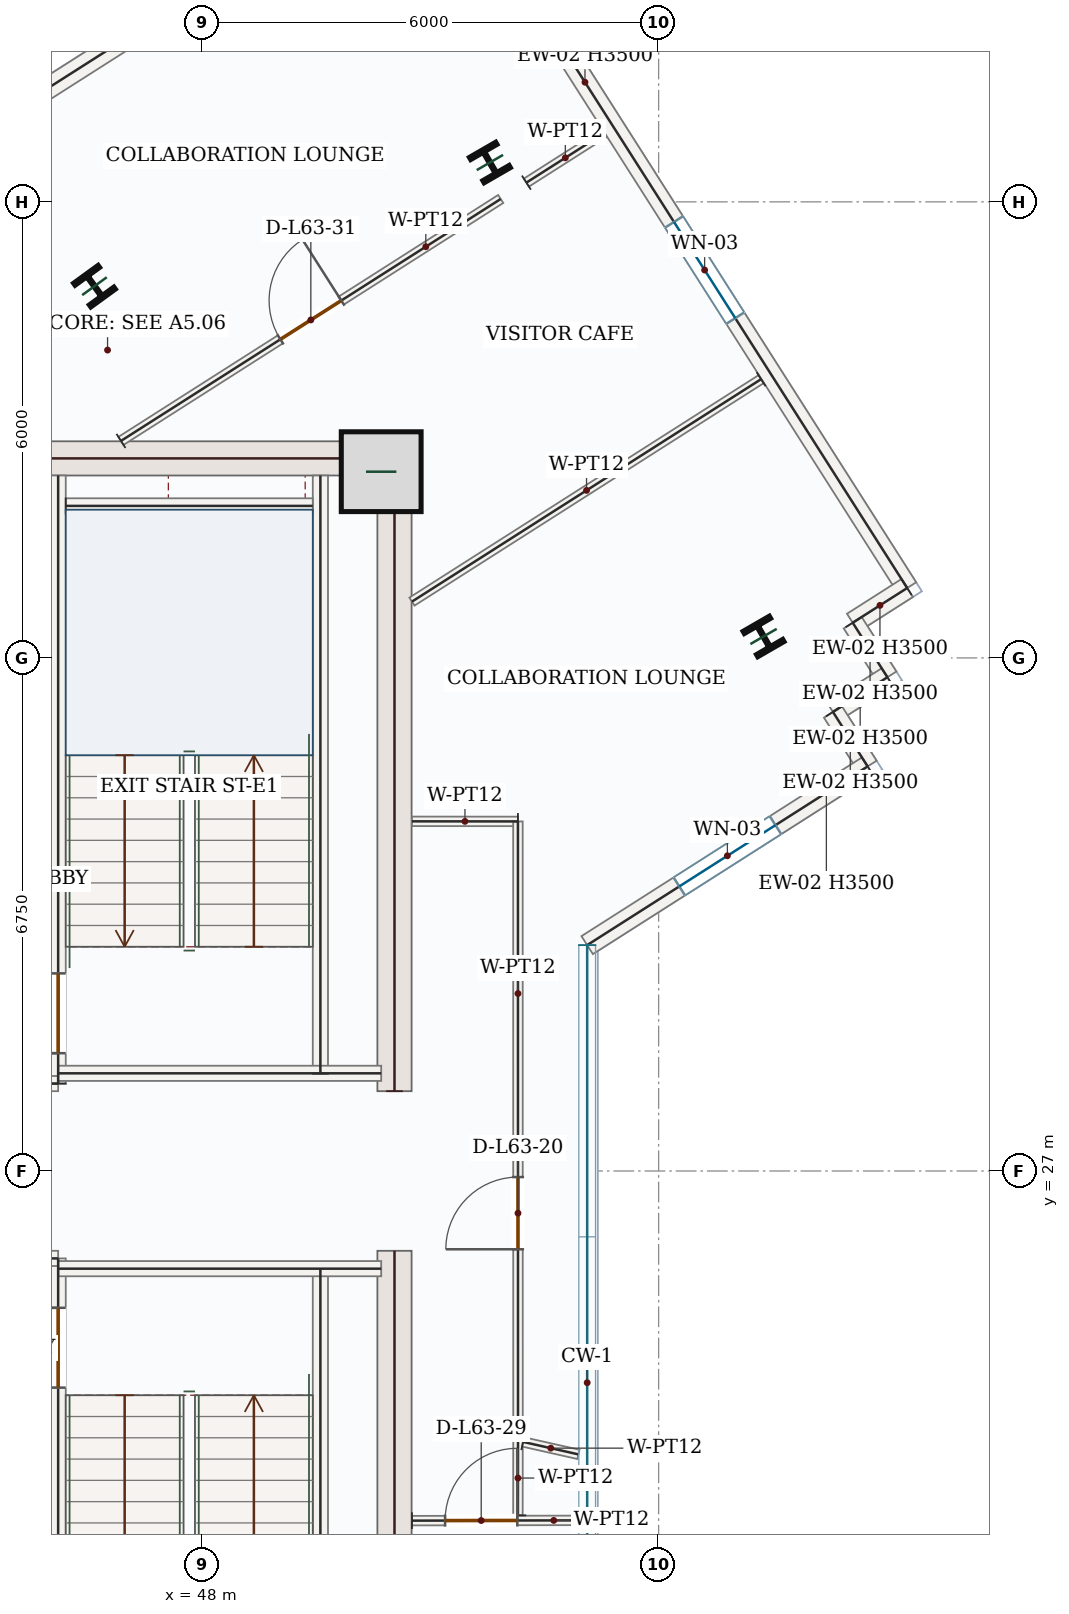
"""IFC4 building model, lengths in metres.
Left out: names, types, materials, properties, quantities, classifications, styles, units other than length and angle.
Written with IfcOpenShell. Run it as: python <this file> out.ifc"""

import sys

from ifc_helpers import new_model, si_unit, direction, frame, frame_2d, origin, origin_2d, place, context, subcontext, project, spatial, rectangle, i_section, extrude, source, transform, mapped, element, fill, save


model = new_model("IFC4")
c1 = context("Model", 3, precision=1e-05, world=origin(), true_north=direction((0.0, 1.0)))
c2 = subcontext(c1, "Body", "Model", "MODEL_VIEW")
j1 = project(units=[si_unit("LENGTHUNIT", "METRE"), si_unit("PLANEANGLEUNIT", "RADIAN")], contexts=[c1])
p1 = place(None, origin())
s1 = spatial("IfcSite", under=j1, at=p1, CompositionType="ELEMENT")
p2 = place(p1, origin())
s2 = spatial("IfcBuilding", under=s1, at=p2, CompositionType="ELEMENT")
p3 = place(p2, frame((0.0, 0.0, 265.35)))
s3 = spatial("IfcBuildingStorey", under=s2, at=p3, CompositionType="ELEMENT", Elevation=265.35)
m1 = source(origin(), c2, "Body", "SweptSolid", [
    extrude(rectangle(XDim=8.55, YDim=0.45, at=frame_2d((4.275, 0.0))), origin(), (0.0, 0.0, 1.0), 3.5),
])
for number, where, z_axis, x_axis in (
    (1, (50.525, 17.4, 0.0), (0.0, 0.0, 1.0), (0.0, 1.0, 0.0)),
    (2, (50.525, 28.05, 0.0), (0.0, 0.0, 1.0), (0.0, 1.0, 0.0)),
):
    element("IfcWall", number, at=place(p3, frame(where, z_axis=z_axis, x_axis=x_axis)), inside=s3, PredefinedType="SHEAR", context=c2, shape_type="MappedRepresentation", body=[
        mapped(m1, transform((0.0, 0.0, 0.0), x_axis=(1.0, 0.0, 0.0), y_axis=(0.0, 1.0, 0.0), z_axis=(0.0, 0.0, 1.0), scale=1.0)),
    ])
m2 = source(origin(), c2, "Body", "SweptSolid", [
    extrude(rectangle(XDim=7.1, YDim=0.45, at=frame_2d((3.55, 0.0))), origin(), (0.0, 0.0, 1.0), 3.5),
])
p4 = place(p3, frame((43.2, 36.375, 0.0), z_axis=(0.0, 0.0, 1.0), x_axis=(1.0, 0.0, 0.0)))
e3 = element("IfcWall", 3, at=p4, inside=s3, PredefinedType="SHEAR", context=c2, shape_type="MappedRepresentation", body=[
    mapped(m2, transform((0.0, 0.0, 0.0), x_axis=(1.0, 0.0, 0.0), y_axis=(0.0, 1.0, 0.0), z_axis=(0.0, 0.0, 1.0), scale=1.0)),
])
m3 = source(origin(), c2, "Body", "SweptSolid", [
    extrude(rectangle(XDim=1.05, YDim=1.05, at=origin_2d()), origin(), (0.0, 0.0, 1.0), 3.75),
])
p5 = place(p3, frame((50.35, 36.2, 0.0), z_axis=(0.0, 0.0, 1.0), x_axis=(1.0, 0.0, 0.0)))
e4 = element("IfcColumn", 4, at=p5, inside=s3, PredefinedType="COLUMN", context=c2, shape_type="MappedRepresentation", body=[
    mapped(m3, transform((0.0, 0.0, 0.0), x_axis=(1.0, 0.0, 0.0), y_axis=(0.0, 1.0, 0.0), z_axis=(0.0, 0.0, 1.0), scale=1.0)),
])
m4 = source(origin(), c2, "Body", "SweptSolid", [
    extrude(i_section(OverallWidth=0.399, OverallDepth=0.386, WebThickness=0.021, FlangeThickness=0.033, FilletRadius=0.018, at=origin_2d()), origin(), (0.0, 0.0, 1.0), 3.75),
])
for number, where, z_axis, x_axis in (
    (5, (46.578, 38.641, 0.0), (0.0, 0.0, 1.0), (0.809, 0.588, 0.0)),
    (6, (55.38, 34.032, 0.0), (0.0, 0.0, 1.0), (0.866, 0.5, 0.0)),
    (7, (51.78, 40.268, 0.0), (0.0, 0.0, 1.0), (0.866, 0.5, 0.0)),
):
    element("IfcColumn", number, at=place(p3, frame(where, z_axis=z_axis, x_axis=x_axis)), inside=s3, PredefinedType="COLUMN", context=c2, shape_type="MappedRepresentation", body=[
        mapped(m4, transform((0.0, 0.0, 0.0), x_axis=(1.0, 0.0, 0.0), y_axis=(0.0, 1.0, 0.0), z_axis=(0.0, 0.0, 1.0), scale=1.0)),
    ])
p6 = place(p3, frame((42.849, 39.26, 0.0), z_axis=(0.0, 0.0, 1.0), x_axis=(0.843388565396, 0.537304129669, 0.0)))
e8 = element("IfcWall", 8, at=p6, inside=s3, PredefinedType="SOLIDWALL", context=c2, shape_type="SweptSolid", body=[
    extrude(rectangle(XDim=7.996, YDim=0.28, at=frame_2d((3.998, 0.0))), origin(), (0.0, 0.0, 1.0), 3.5),
])
p7 = place(p6, frame((2.223, 0.0, 0.0)))
e9 = element("IfcOpeningElement", 9, at=p7, cuts=e8, PredefinedType="OPENING", context=c2, shape_type="SweptSolid", body=[
    extrude(rectangle(XDim=1.05, YDim=2.15, at=frame_2d((0.525, 1.075))), frame((0.0, 0.15, 0.0), z_axis=(0.0, -1.0, 0.0), x_axis=(1.0, 0.0, 0.0)), (0.0, 0.0, 1.0), 0.3),
])
p8 = place(p3, frame((51.94, 43.036, 0.0), z_axis=(0.0, 0.0, 1.0), x_axis=(0.537314949054, -0.843381672508, 0.0)))
e10 = element("IfcWall", 10, at=p8, inside=s3, PredefinedType="SOLIDWALL", context=c2, shape_type="SweptSolid", body=[
    extrude(rectangle(XDim=9.92, YDim=0.28, at=frame_2d((4.96, 0.0))), origin(), (0.0, 0.0, 1.0), 3.5),
])
p9 = place(p8, frame((4.21, 0.0, 0.85)))
e11 = element("IfcOpeningElement", 11, at=p9, cuts=e10, PredefinedType="OPENING", context=c2, shape_type="SweptSolid", body=[
    extrude(rectangle(XDim=1.5, YDim=1.5, at=frame_2d((0.75, 0.75))), frame((0.0, 0.15, 0.0), z_axis=(0.0, -1.0, 0.0), x_axis=(1.0, 0.0, 0.0)), (0.0, 0.0, 1.0), 0.3),
])
m5 = source(origin(), c2, "Body", "SweptSolid", [
    extrude(rectangle(XDim=0.85, YDim=0.28, at=frame_2d((0.425, 0.0))), origin(), (0.0, 0.0, 1.0), 3.5),
])
p10 = place(p3, frame((57.27, 34.67, 0.0), z_axis=(0.0, 0.0, 1.0), x_axis=(-0.843401251716, -0.537284215853, 0.0)))
e12 = element("IfcWall", 12, at=p10, inside=s3, PredefinedType="SOLIDWALL", context=c2, shape_type="MappedRepresentation", body=[
    mapped(m5, transform((0.0, 0.0, 0.0), x_axis=(1.0, 0.0, 0.0), y_axis=(0.0, 1.0, 0.0), z_axis=(0.0, 0.0, 1.0), scale=1.0)),
])
m6 = source(origin(), c2, "Body", "SweptSolid", [
    extrude(rectangle(XDim=0.85, YDim=0.28, at=frame_2d((0.425, 0.0))), origin(), (0.0, 0.0, 1.0), 3.5),
])
for number, where, z_axis, x_axis in (
    (13, (56.553, 34.213, 0.0), (0.0, 0.0, 1.0), (0.537, -0.843, 0.0)),
    (14, (57.01, 33.496, 0.0), (0.0, 0.0, 1.0), (-0.843, -0.537, 0.0)),
    (15, (56.293, 33.039, 0.0), (0.0, 0.0, 1.0), (0.537, -0.843, 0.0)),
):
    element("IfcWall", number, at=place(p3, frame(where, z_axis=z_axis, x_axis=x_axis)), inside=s3, PredefinedType="SOLIDWALL", context=c2, shape_type="MappedRepresentation", body=[
        mapped(m6, transform((0.0, 0.0, 0.0), x_axis=(1.0, 0.0, 0.0), y_axis=(0.0, 1.0, 0.0), z_axis=(0.0, 0.0, 1.0), scale=1.0)),
    ])
p11 = place(p3, frame((56.75, 32.323, 0.0), z_axis=(0.0, 0.0, 1.0), x_axis=(-0.843383352012, -0.537312312857, 0.0)))
e16 = element("IfcWall", 16, at=p11, inside=s3, PredefinedType="SOLIDWALL", context=c2, shape_type="SweptSolid", body=[
    extrude(rectangle(XDim=4.375, YDim=0.28, at=frame_2d((2.188, 0.0))), origin(), (0.0, 0.0, 1.0), 3.5),
])
p12 = place(p11, frame((1.438, 0.0, 0.85)))
e17 = element("IfcOpeningElement", 17, at=p12, cuts=e16, PredefinedType="OPENING", context=c2, shape_type="SweptSolid", body=[
    extrude(rectangle(XDim=1.5, YDim=1.5, at=frame_2d((0.75, 0.75))), frame((0.0, 0.15, 0.0), z_axis=(0.0, -1.0, 0.0), x_axis=(1.0, 0.0, 0.0)), (0.0, 0.0, 1.0), 0.3),
])
m7 = source(origin(), c2, "Body", "SweptSolid", [
    extrude(rectangle(XDim=7.87, YDim=0.2, at=frame_2d((3.935, 0.0))), origin(), (0.0, 0.0, 1.0), 3.5),
])
for number, where, z_axis, x_axis in (
    (18, (49.55, 17.85, 0.0), (0.0, 0.0, 1.0), (0.0, 1.0, 0.0)),
    (19, (49.55, 28.28, 0.0), (0.0, 0.0, 1.0), (0.0, 1.0, 0.0)),
):
    element("IfcWall", number, at=place(p3, frame(where, z_axis=z_axis, x_axis=x_axis)), inside=s3, PredefinedType="SOLIDWALL", context=c2, shape_type="MappedRepresentation", body=[
        mapped(m7, transform((0.0, 0.0, 0.0), x_axis=(1.0, 0.0, 0.0), y_axis=(0.0, 1.0, 0.0), z_axis=(0.0, 0.0, 1.0), scale=1.0)),
    ])
p13 = place(p3, frame((46.1, 17.85, 0.0), z_axis=(0.0, 0.0, 1.0), x_axis=(0.0, 1.0, 0.0)))
e20 = element("IfcWall", 20, at=p13, inside=s3, PredefinedType="SOLIDWALL", context=c2, shape_type="SweptSolid", body=[
    extrude(rectangle(XDim=8.0, YDim=0.2, at=frame_2d((4.0, 0.0))), origin(), (0.0, 0.0, 1.0), 3.5),
])
p14 = place(p13, frame((6.3, 0.0, 0.0)))
e21 = element("IfcOpeningElement", 21, at=p14, cuts=e20, PredefinedType="OPENING", context=c2, shape_type="SweptSolid", body=[
    extrude(rectangle(XDim=1.05, YDim=2.15, at=frame_2d((0.525, 1.075))), frame((0.0, 0.11, 0.0), z_axis=(0.0, -1.0, 0.0), x_axis=(1.0, 0.0, 0.0)), (0.0, 0.0, 1.0), 0.22),
])
p15 = place(p3, frame((46.1, 28.15, 0.0), z_axis=(0.0, 0.0, 1.0), x_axis=(0.0, 1.0, 0.0)))
e22 = element("IfcWall", 22, at=p15, inside=s3, PredefinedType="SOLIDWALL", context=c2, shape_type="SweptSolid", body=[
    extrude(rectangle(XDim=8.0, YDim=0.2, at=frame_2d((4.0, 0.0))), origin(), (0.0, 0.0, 1.0), 3.5),
])
p16 = place(p15, frame((0.4, 0.0, 0.0)))
e23 = element("IfcOpeningElement", 23, at=p16, cuts=e22, PredefinedType="OPENING", context=c2, shape_type="SweptSolid", body=[
    extrude(rectangle(XDim=1.05, YDim=2.15, at=frame_2d((0.525, 1.075))), frame((0.0, 0.11, 0.0), z_axis=(0.0, -1.0, 0.0), x_axis=(1.0, 0.0, 0.0)), (0.0, 0.0, 1.0), 0.22),
])
m8 = source(origin(), c2, "Body", "SweptSolid", [
    extrude(rectangle(XDim=3.0, YDim=0.2, at=frame_2d((1.5, 0.0))), origin(), (0.0, 0.0, 1.0), 3.5),
])
p17 = place(p3, frame((43.1, 25.85, 0.0), z_axis=(0.0, 0.0, 1.0), x_axis=(1.0, 0.0, 0.0)))
e24 = element("IfcWall", 24, at=p17, inside=s3, PredefinedType="SOLIDWALL", context=c2, shape_type="MappedRepresentation", body=[
    mapped(m8, transform((0.0, 0.0, 0.0), x_axis=(1.0, 0.0, 0.0), y_axis=(0.0, 1.0, 0.0), z_axis=(0.0, 0.0, 1.0), scale=1.0)),
])
m9 = source(origin(), c2, "Body", "SweptSolid", [
    extrude(rectangle(XDim=4.25, YDim=0.2, at=frame_2d((2.125, 0.0))), origin(), (0.0, 0.0, 1.0), 3.5),
])
p18 = place(p3, frame((46.1, 25.715, 0.0), z_axis=(0.0, 0.0, 1.0), x_axis=(1.0, 0.0, 0.0)))
e25 = element("IfcWall", 25, at=p18, inside=s3, PredefinedType="SOLIDWALL", context=c2, shape_type="MappedRepresentation", body=[
    mapped(m9, transform((0.0, 0.0, 0.0), x_axis=(1.0, 0.0, 0.0), y_axis=(0.0, 1.0, 0.0), z_axis=(0.0, 0.0, 1.0), scale=1.0)),
])
p19 = place(p3, frame((43.1, 28.15, 0.0), z_axis=(0.0, 0.0, 1.0), x_axis=(1.0, 0.0, 0.0)))
e26 = element("IfcWall", 26, at=p19, inside=s3, PredefinedType="SOLIDWALL", context=c2, shape_type="MappedRepresentation", body=[
    mapped(m8, transform((0.0, 0.0, 0.0), x_axis=(1.0, 0.0, 0.0), y_axis=(0.0, 1.0, 0.0), z_axis=(0.0, 0.0, 1.0), scale=1.0)),
])
p20 = place(p3, frame((46.1, 28.285, 0.0), z_axis=(0.0, 0.0, 1.0), x_axis=(1.0, 0.0, 0.0)))
e27 = element("IfcWall", 27, at=p20, inside=s3, PredefinedType="SOLIDWALL", context=c2, shape_type="MappedRepresentation", body=[
    mapped(m9, transform((0.0, 0.0, 0.0), x_axis=(1.0, 0.0, 0.0), y_axis=(0.0, 1.0, 0.0), z_axis=(0.0, 0.0, 1.0), scale=1.0)),
])
m10 = source(origin(), c2, "Body", "SweptSolid", [
    extrude(rectangle(XDim=3.25, YDim=0.2, at=frame_2d((1.625, 0.0))), origin(), (0.0, 0.0, 1.0), 3.5),
])
p21 = place(p3, frame((46.2, 35.75, 0.0), z_axis=(0.0, 0.0, 1.0), x_axis=(1.0, 0.0, 0.0)))
e28 = element("IfcWall", 28, at=p21, inside=s3, PredefinedType="SOLIDWALL", context=c2, shape_type="MappedRepresentation", body=[
    mapped(m10, transform((0.0, 0.0, 0.0), x_axis=(1.0, 0.0, 0.0), y_axis=(0.0, 1.0, 0.0), z_axis=(0.0, 0.0, 1.0), scale=1.0)),
])
p22 = place(p3, frame((46.927, 36.605, 0.0), z_axis=(0.0, 0.0, 1.0), x_axis=(0.843398332862, 0.537288797693, 0.0)))
e29 = element("IfcWall", 29, at=p22, inside=s3, PredefinedType="PARTITIONING", context=c2, shape_type="SweptSolid", body=[
    extrude(rectangle(XDim=5.924, YDim=0.125, at=frame_2d((2.962, 0.0))), origin(), (0.0, 0.0, 1.0), 3.5),
])
p23 = place(p22, frame((2.487, 0.0, 0.0)))
e30 = element("IfcOpeningElement", 30, at=p23, cuts=e29, PredefinedType="OPENING", context=c2, shape_type="SweptSolid", body=[
    extrude(rectangle(XDim=0.95, YDim=2.15, at=frame_2d((0.475, 1.075))), frame((0.0, 0.073, 0.0), z_axis=(0.0, -1.0, 0.0), x_axis=(1.0, 0.0, 0.0)), (0.0, 0.0, 1.0), 0.145),
])
m11 = source(origin(), c2, "Body", "SweptSolid", [
    extrude(rectangle(XDim=1.215, YDim=0.125, at=frame_2d((0.607, 0.0))), origin(), (0.0, 0.0, 1.0), 3.5),
])
p24 = place(p3, frame((52.26, 40.003, 0.0), z_axis=(0.0, 0.0, 1.0), x_axis=(0.84340481812, 0.537278617453, 0.0)))
e31 = element("IfcWall", 31, at=p24, inside=s3, PredefinedType="PARTITIONING", context=c2, shape_type="MappedRepresentation", body=[
    mapped(m11, transform((0.0, 0.0, 0.0), x_axis=(1.0, 0.0, 0.0), y_axis=(0.0, 1.0, 0.0), z_axis=(0.0, 0.0, 1.0), scale=1.0)),
])
m12 = source(origin(), c2, "Body", "SweptSolid", [
    extrude(rectangle(XDim=5.446, YDim=0.125, at=frame_2d((2.723, 0.0))), origin(), (0.0, 0.0, 1.0), 3.5),
])
p25 = place(p3, frame((55.348, 37.417, 0.0), z_axis=(0.0, 0.0, 1.0), x_axis=(-0.843395566027, -0.537293140851, 0.0)))
e32 = element("IfcWall", 32, at=p25, inside=s3, PredefinedType="PARTITIONING", context=c2, shape_type="MappedRepresentation", body=[
    mapped(m12, transform((0.0, 0.0, 0.0), x_axis=(1.0, 0.0, 0.0), y_axis=(0.0, 1.0, 0.0), z_axis=(0.0, 0.0, 1.0), scale=1.0)),
])
p26 = place(p3, frame((50.755, 22.4, 0.0), z_axis=(0.0, 0.0, 1.0), x_axis=(0.999998787702, 0.001557110781, 0.0)))
e33 = element("IfcWall", 33, at=p26, inside=s3, PredefinedType="PARTITIONING", context=c2, shape_type="SweptSolid", body=[
    extrude(rectangle(XDim=2.195, YDim=0.125, at=frame_2d((1.098, 0.0))), origin(), (0.0, 0.0, 1.0), 3.5),
])
p27 = place(p26, frame((0.436, 0.0, 0.0)))
e34 = element("IfcOpeningElement", 34, at=p27, cuts=e33, PredefinedType="OPENING", context=c2, shape_type="SweptSolid", body=[
    extrude(rectangle(XDim=0.95, YDim=2.15, at=frame_2d((0.475, 1.075))), frame((0.0, 0.073, 0.0), z_axis=(0.0, -1.0, 0.0), x_axis=(1.0, 0.0, 0.0)), (0.0, 0.0, 1.0), 0.145),
])
m13 = source(origin(), c2, "Body", "SweptSolid", [
    extrude(rectangle(XDim=0.981, YDim=0.125, at=frame_2d((0.491, 0.0))), origin(), (0.0, 0.0, 1.0), 3.5),
])
p28 = place(p3, frame((52.149, 22.47, 0.0), z_axis=(0.0, 0.0, 1.0), x_axis=(0.001244089607, 0.99999922612, 0.0)))
e35 = element("IfcWall", 35, at=p28, inside=s3, PredefinedType="PARTITIONING", context=c2, shape_type="MappedRepresentation", body=[
    mapped(m13, transform((0.0, 0.0, 0.0), x_axis=(1.0, 0.0, 0.0), y_axis=(0.0, 1.0, 0.0), z_axis=(0.0, 0.0, 1.0), scale=1.0)),
])
m14 = source(origin(), c2, "Body", "SweptSolid", [
    extrude(rectangle(XDim=0.746, YDim=0.125, at=frame_2d((0.373, 0.0))), origin(), (0.0, 0.0, 1.0), 3.5),
])
p29 = place(p3, frame((52.218, 23.436, 0.0), z_axis=(0.0, 0.0, 1.0), x_axis=(0.975574688732, -0.219667991993, 0.0)))
e36 = element("IfcWall", 36, at=p29, inside=s3, PredefinedType="PARTITIONING", context=c2, shape_type="MappedRepresentation", body=[
    mapped(m14, transform((0.0, 0.0, 0.0), x_axis=(1.0, 0.0, 0.0), y_axis=(0.0, 1.0, 0.0), z_axis=(0.0, 0.0, 1.0), scale=1.0)),
])
m15 = source(origin(), c2, "Body", "SweptSolid", [
    extrude(rectangle(XDim=1.394, YDim=0.125, at=frame_2d((0.697, 0.0))), origin(), (0.0, 0.0, 1.0), 3.5),
])
p30 = place(p3, frame((52.149, 31.599, 0.0), z_axis=(0.0, 0.0, 1.0), x_axis=(-0.999999754632, 0.000700525222, 0.0)))
e37 = element("IfcWall", 37, at=p30, inside=s3, PredefinedType="PARTITIONING", context=c2, shape_type="MappedRepresentation", body=[
    mapped(m15, transform((0.0, 0.0, 0.0), x_axis=(1.0, 0.0, 0.0), y_axis=(0.0, 1.0, 0.0), z_axis=(0.0, 0.0, 1.0), scale=1.0)),
])
p31 = place(p3, frame((52.15, 23.451, 0.0), z_axis=(0.0, 0.0, 1.0), x_axis=(-0.000119850186, 0.999999992818, 0.0)))
e38 = element("IfcWall", 38, at=p31, inside=s3, PredefinedType="PARTITIONING", context=c2, shape_type="SweptSolid", body=[
    extrude(rectangle(XDim=8.148, YDim=0.125, at=frame_2d((4.074, 0.0))), origin(), (0.0, 0.0, 1.0), 3.5),
])
p32 = place(p31, frame((2.519, 0.0, 0.0)))
e39 = element("IfcOpeningElement", 39, at=p32, cuts=e38, PredefinedType="OPENING", context=c2, shape_type="SweptSolid", body=[
    extrude(rectangle(XDim=0.95, YDim=2.15, at=frame_2d((0.475, 1.075))), frame((0.0, 0.073, 0.0), z_axis=(0.0, -1.0, 0.0), x_axis=(1.0, 0.0, 0.0)), (0.0, 0.0, 1.0), 0.145),
])
m16 = source(origin(), c2, "Body", "SweptSolid", [
    extrude(rectangle(XDim=1.5, YDim=1.5, at=frame_2d((0.75, 0.75))), frame((0.0, 0.03, 0.0), z_axis=(0.0, -1.0, 0.0), x_axis=(1.0, 0.0, 0.0)), (0.0, 0.0, 1.0), 0.06),
])
p33 = place(p9, origin())
e40 = element("IfcWindow", 40, at=p33, inside=s3, PartitioningType="SINGLE_PANEL", PredefinedType="WINDOW", context=c2, shape_type="MappedRepresentation", body=[
    mapped(m16, transform((0.0, 0.0, 0.0), x_axis=(1.0, 0.0, 0.0), y_axis=(0.0, 1.0, 0.0), z_axis=(0.0, 0.0, 1.0), scale=1.0)),
])
fill(e11, e40)
p34 = place(p12, origin())
e41 = element("IfcWindow", 41, at=p34, inside=s3, PartitioningType="SINGLE_PANEL", PredefinedType="WINDOW", context=c2, shape_type="MappedRepresentation", body=[
    mapped(m16, transform((0.0, 0.0, 0.0), x_axis=(1.0, 0.0, 0.0), y_axis=(0.0, 1.0, 0.0), z_axis=(0.0, 0.0, 1.0), scale=1.0)),
])
fill(e17, e41)
m17 = source(origin(), c2, "Body", "SweptSolid", [
    extrude(rectangle(XDim=1.05, YDim=2.15, at=frame_2d((0.525, 1.075))), frame((0.0, 0.025, 0.0), z_axis=(0.0, -1.0, 0.0), x_axis=(1.0, 0.0, 0.0)), (0.0, 0.0, 1.0), 0.05),
])
p35 = place(p16, origin())
e42 = element("IfcDoor", 42, at=p35, inside=s3, OperationType="SINGLE_SWING_LEFT", PredefinedType="DOOR", context=c2, shape_type="MappedRepresentation", body=[
    mapped(m17, transform((0.0, 0.0, 0.0), x_axis=(1.0, 0.0, 0.0), y_axis=(0.0, 1.0, 0.0), z_axis=(0.0, 0.0, 1.0), scale=1.0)),
])
fill(e23, e42)
p36 = place(p14, origin())
e43 = element("IfcDoor", 43, at=p36, inside=s3, OperationType="SINGLE_SWING_RIGHT", PredefinedType="DOOR", context=c2, shape_type="MappedRepresentation", body=[
    mapped(m17, transform((0.0, 0.0, 0.0), x_axis=(1.0, 0.0, 0.0), y_axis=(0.0, 1.0, 0.0), z_axis=(0.0, 0.0, 1.0), scale=1.0)),
])
fill(e21, e43)
m18 = source(origin(), c2, "Body", "SweptSolid", [
    extrude(rectangle(XDim=0.95, YDim=2.15, at=frame_2d((0.475, 1.075))), frame((0.0, 0.025, 0.0), z_axis=(0.0, -1.0, 0.0), x_axis=(1.0, 0.0, 0.0)), (0.0, 0.0, 1.0), 0.05),
])
p37 = place(p32, origin())
e44 = element("IfcDoor", 44, at=p37, inside=s3, OperationType="SINGLE_SWING_LEFT", PredefinedType="DOOR", context=c2, shape_type="MappedRepresentation", body=[
    mapped(m18, transform((0.0, 0.0, 0.0), x_axis=(1.0, 0.0, 0.0), y_axis=(0.0, 1.0, 0.0), z_axis=(0.0, 0.0, 1.0), scale=1.0)),
])
fill(e39, e44)
p38 = place(p27, origin())
e45 = element("IfcDoor", 45, at=p38, inside=s3, OperationType="SINGLE_SWING_RIGHT", PredefinedType="DOOR", context=c2, shape_type="MappedRepresentation", body=[
    mapped(m18, transform((0.0, 0.0, 0.0), x_axis=(1.0, 0.0, 0.0), y_axis=(0.0, 1.0, 0.0), z_axis=(0.0, 0.0, 1.0), scale=1.0)),
])
fill(e34, e45)
p39 = place(p23, origin())
e46 = element("IfcDoor", 46, at=p39, inside=s3, OperationType="SINGLE_SWING_RIGHT", PredefinedType="DOOR", context=c2, shape_type="MappedRepresentation", body=[
    mapped(m18, transform((0.0, 0.0, 0.0), x_axis=(1.0, 0.0, 0.0), y_axis=(0.0, 1.0, 0.0), z_axis=(0.0, 0.0, 1.0), scale=1.0)),
])
fill(e30, e46)
save(model, sys.argv[1])
